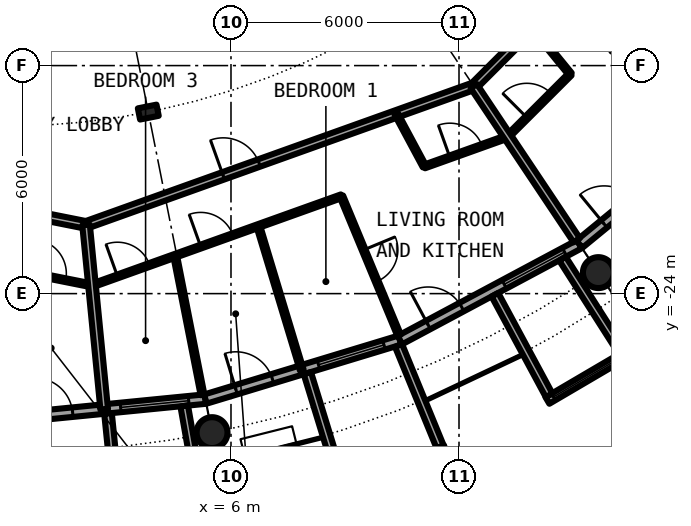
"""IFC4 building model, lengths in metres.
Left out: names, types, materials, properties, quantities, classifications, styles, units other than length and angle.
Written with IfcOpenShell. Run it as: python <this file> out.ifc"""

import sys

from ifc_helpers import new_model, si_unit, direction, frame, frame_2d, origin, origin_2d, place, context, subcontext, project, spatial, rectangle, circle, hollow_circle, i_section, extrude, element, fill, save


model = new_model("IFC4")
c1 = context("Model", 3, precision=1e-05, world=origin(), true_north=direction((0.0, 1.0)))
c2 = subcontext(c1, "Body", "Model", "MODEL_VIEW")
j1 = project(units=[si_unit("LENGTHUNIT", "METRE"), si_unit("PLANEANGLEUNIT", "RADIAN")], contexts=[c1])
p1 = place(None, origin())
s1 = spatial("IfcSite", under=j1, at=p1, CompositionType="ELEMENT")
p2 = place(p1, origin())
s2 = spatial("IfcBuilding", under=s1, at=p2, CompositionType="ELEMENT")
p3 = place(p2, frame((0.0, 0.0, 173.8)))
s3 = spatial("IfcBuildingStorey", under=s2, at=p3, CompositionType="ELEMENT", Elevation=173.8)
for number, where, z_axis, x_axis in (
    (1, (5.501, -27.658, 0.0), (0.0, 0.0, 1.0), (1.0, 0.0, 0.0)),
    (2, (15.667, -23.448, 0.0), (0.0, 0.0, 1.0), (1.0, 0.0, 0.0)),
):
    element("IfcColumn", number, at=place(p3, frame(where, z_axis=z_axis, x_axis=x_axis)), inside=s3, PredefinedType="COLUMN", context=c2, shape_type="SweptSolid", body=[
        extrude(hollow_circle(Radius=0.406, WallThickness=0.04, at=origin_2d()), origin(), (0.0, 0.0, 1.0), 3.05),
    ])
p4 = place(p3, frame((3.824, -19.223, 0.0), z_axis=(0.0, 0.0, 1.0), x_axis=(0.195090322016, -0.980785280403, 0.0)))
e3 = element("IfcColumn", 3, at=p4, inside=s3, PredefinedType="COLUMN", context=c2, shape_type="SweptSolid", body=[
    extrude(i_section(OverallWidth=0.3, OverallDepth=0.5, WebThickness=0.014, FlangeThickness=0.028, FilletRadius=0.027, at=origin_2d()), origin(), (0.0, 0.0, 1.0), 3.05),
])
p5 = place(p3, frame((0.0, -27.3, 0.0), z_axis=(0.0, 0.0, 1.0), x_axis=(0.995173996315, 0.098126026407, 0.0)))
e4 = element("IfcWall", 4, at=p5, inside=s3, PredefinedType="SOLIDWALL", context=c2, shape_type="SweptSolid", body=[
    extrude(rectangle(XDim=5.352, YDim=0.25, at=frame_2d((2.676, 0.0))), origin(), (0.0, 0.0, 1.0), 2.7),
])
p6 = place(p5, frame((0.841, 0.0, 0.0)))
e5 = element("IfcOpeningElement", 5, at=p6, cuts=e4, PredefinedType="OPENING", context=c2, shape_type="SweptSolid", body=[
    extrude(rectangle(XDim=1.0, YDim=2.2, at=frame_2d((0.5, 1.1))), frame((0.0, 0.135, 0.0), z_axis=(0.0, -1.0, 0.0), x_axis=(1.0, 0.0, 0.0)), (0.0, 0.0, 1.0), 0.27),
])
p7 = place(p5, frame((3.111, 0.0, 0.3)))
e6 = element("IfcOpeningElement", 6, at=p7, cuts=e4, PredefinedType="OPENING", context=c2, shape_type="SweptSolid", body=[
    extrude(rectangle(XDim=1.8, YDim=2.1, at=frame_2d((0.9, 1.05))), frame((0.0, 0.135, 0.0), z_axis=(0.0, -1.0, 0.0), x_axis=(1.0, 0.0, 0.0)), (0.0, 0.0, 1.0), 0.27),
])
p8 = place(p3, frame((2.764, -27.153, -0.03), z_axis=(0.0, 0.0, 1.0), x_axis=(0.101505487237, -0.994834979311, 0.0)))
e7 = element("IfcWall", 7, at=p8, inside=s3, PredefinedType="SOLIDWALL", context=c2, shape_type="SweptSolid", body=[
    extrude(rectangle(XDim=3.007, YDim=0.2, at=frame_2d((1.503, 0.0))), origin(), (0.0, 0.0, 1.0), 2.73),
])
p9 = place(p3, frame((4.769, -26.956, -0.03), z_axis=(0.0, 0.0, 1.0), x_axis=(0.174056778901, -0.984735618183, 0.0)))
e8 = element("IfcWall", 8, at=p9, inside=s3, PredefinedType="SOLIDWALL", context=c2, shape_type="SweptSolid", body=[
    extrude(rectangle(XDim=2.925, YDim=0.2, at=frame_2d((1.462, 0.0))), origin(), (0.0, 0.0, 1.0), 2.73),
])
p10 = place(p3, frame((5.326, -26.775, 0.0), z_axis=(0.0, 0.0, 1.0), x_axis=(0.956965678721, 0.290201119486, 0.0)))
e9 = element("IfcWall", 9, at=p10, inside=s3, PredefinedType="SOLIDWALL", context=c2, shape_type="SweptSolid", body=[
    extrude(rectangle(XDim=5.351, YDim=0.25, at=frame_2d((2.676, 0.0))), origin(), (0.0, 0.0, 1.0), 2.7),
])
p11 = place(p10, frame((0.841, 0.0, 0.0)))
e10 = element("IfcOpeningElement", 10, at=p11, cuts=e9, PredefinedType="OPENING", context=c2, shape_type="SweptSolid", body=[
    extrude(rectangle(XDim=1.0, YDim=2.2, at=frame_2d((0.5, 1.1))), frame((0.0, 0.135, 0.0), z_axis=(0.0, -1.0, 0.0), x_axis=(1.0, 0.0, 0.0)), (0.0, 0.0, 1.0), 0.27),
])
p12 = place(p10, frame((3.111, 0.0, 0.3)))
e11 = element("IfcOpeningElement", 11, at=p12, cuts=e9, PredefinedType="OPENING", context=c2, shape_type="SweptSolid", body=[
    extrude(rectangle(XDim=1.8, YDim=2.1, at=frame_2d((0.9, 1.05))), frame((0.0, 0.135, 0.0), z_axis=(0.0, -1.0, 0.0), x_axis=(1.0, 0.0, 0.0)), (0.0, 0.0, 1.0), 0.27),
])
p13 = place(p3, frame((8.82, -29.093, -0.03), z_axis=(0.0, 0.0, 1.0), x_axis=(0.941461077774, 0.337121697664, 0.0)))
e12 = element("IfcWall", 12, at=p13, inside=s3, PredefinedType="SOLIDWALL", context=c2, shape_type="SweptSolid", body=[
    extrude(rectangle(XDim=2.993, YDim=0.2, at=frame_2d((1.497, 0.0))), origin(), (0.0, 0.0, 1.0), 2.73),
])
p14 = place(p13, frame((0.457, 0.0, 0.33)))
e13 = element("IfcOpeningElement", 13, at=p14, cuts=e12, PredefinedType="OPENING", context=c2, shape_type="SweptSolid", body=[
    extrude(circle(Radius=1.04, at=frame_2d((1.04, 1.04))), frame((0.0, 0.11, 0.0), z_axis=(0.0, -1.0, 0.0), x_axis=(1.0, 0.0, 0.0)), (0.0, 0.0, 1.0), 0.22),
])
p15 = place(p3, frame((8.009, -26.092, -0.03), z_axis=(0.0, 0.0, 1.0), x_axis=(0.293406695073, -0.955987715029, 0.0)))
e14 = element("IfcWall", 14, at=p15, inside=s3, PredefinedType="SOLIDWALL", context=c2, shape_type="SweptSolid", body=[
    extrude(rectangle(XDim=3.006, YDim=0.2, at=frame_2d((1.503, 0.0))), origin(), (0.0, 0.0, 1.0), 2.73),
])
p16 = place(p3, frame((10.409, -25.364, -0.03), z_axis=(0.0, 0.0, 1.0), x_axis=(0.379509886562, -0.925187681501, 0.0)))
e15 = element("IfcWall", 15, at=p16, inside=s3, PredefinedType="SOLIDWALL", context=c2, shape_type="SweptSolid", body=[
    extrude(rectangle(XDim=2.883, YDim=0.2, at=frame_2d((1.441, 0.0))), origin(), (0.0, 0.0, 1.0), 2.73),
])
p17 = place(p3, frame((10.447, -25.222, 0.0), z_axis=(0.0, 0.0, 1.0), x_axis=(0.881915646801, 0.471407246368, 0.0)))
e16 = element("IfcWall", 16, at=p17, inside=s3, PredefinedType="SOLIDWALL", context=c2, shape_type="SweptSolid", body=[
    extrude(rectangle(XDim=5.352, YDim=0.25, at=frame_2d((2.676, 0.0))), origin(), (0.0, 0.0, 1.0), 2.7),
])
p18 = place(p17, frame((0.841, 0.0, 0.0)))
e17 = element("IfcOpeningElement", 17, at=p18, cuts=e16, PredefinedType="OPENING", context=c2, shape_type="SweptSolid", body=[
    extrude(rectangle(XDim=1.0, YDim=2.2, at=frame_2d((0.5, 1.1))), frame((0.0, 0.135, 0.0), z_axis=(0.0, -1.0, 0.0), x_axis=(1.0, 0.0, 0.0)), (0.0, 0.0, 1.0), 0.27),
])
p19 = place(p17, frame((3.111, 0.0, 0.3)))
e18 = element("IfcOpeningElement", 18, at=p19, cuts=e16, PredefinedType="OPENING", context=c2, shape_type="SweptSolid", body=[
    extrude(rectangle(XDim=1.8, YDim=2.1, at=frame_2d((0.9, 1.05))), frame((0.0, 0.135, 0.0), z_axis=(0.0, -1.0, 0.0), x_axis=(1.0, 0.0, 0.0)), (0.0, 0.0, 1.0), 0.27),
])
p20 = place(p3, frame((14.327, -26.812, -0.03), z_axis=(0.0, 0.0, 1.0), x_axis=(0.862403467503, 0.506221551535, 0.0)))
e19 = element("IfcWall", 19, at=p20, inside=s3, PredefinedType="SOLIDWALL", context=c2, shape_type="SweptSolid", body=[
    extrude(rectangle(XDim=2.446, YDim=0.2, at=frame_2d((1.223, 0.0))), origin(), (0.0, 0.0, 1.0), 2.73),
])
p21 = place(p20, frame((0.183, 0.0, 0.33)))
e20 = element("IfcOpeningElement", 20, at=p21, cuts=e19, PredefinedType="OPENING", context=c2, shape_type="SweptSolid", body=[
    extrude(circle(Radius=1.04, at=frame_2d((1.04, 1.04))), frame((0.0, 0.11, 0.0), z_axis=(0.0, -1.0, 0.0), x_axis=(1.0, 0.0, 0.0)), (0.0, 0.0, 1.0), 0.22),
])
p22 = place(p3, frame((12.945, -24.029, -0.03), z_axis=(0.0, 0.0, 1.0), x_axis=(0.474424310775, -0.88029629861, 0.0)))
e21 = element("IfcWall", 21, at=p22, inside=s3, PredefinedType="SOLIDWALL", context=c2, shape_type="SweptSolid", body=[
    extrude(rectangle(XDim=3.006, YDim=0.2, at=frame_2d((1.503, 0.0))), origin(), (0.0, 0.0, 1.0), 2.73),
])
p23 = place(p3, frame((14.722, -23.079, -0.03), z_axis=(0.0, 0.0, 1.0), x_axis=(0.537572179146, -0.843217737129, 0.0)))
e22 = element("IfcWall", 22, at=p23, inside=s3, PredefinedType="SOLIDWALL", context=c2, shape_type="SweptSolid", body=[
    extrude(rectangle(XDim=2.924, YDim=0.2, at=frame_2d((1.462, 0.0))), origin(), (0.0, 0.0, 1.0), 2.73),
])
p24 = place(p3, frame((15.167, -22.699, 0.0), z_axis=(0.0, 0.0, 1.0), x_axis=(0.773019449054, 0.634382322723, 0.0)))
e23 = element("IfcWall", 23, at=p24, inside=s3, PredefinedType="SOLIDWALL", context=c2, shape_type="SweptSolid", body=[
    extrude(rectangle(XDim=5.352, YDim=0.25, at=frame_2d((2.676, 0.0))), origin(), (0.0, 0.0, 1.0), 2.7),
])
p25 = place(p24, frame((0.841, 0.0, 0.0)))
e24 = element("IfcOpeningElement", 24, at=p25, cuts=e23, PredefinedType="OPENING", context=c2, shape_type="SweptSolid", body=[
    extrude(rectangle(XDim=1.0, YDim=2.2, at=frame_2d((0.5, 1.1))), frame((0.0, 0.135, 0.0), z_axis=(0.0, -1.0, 0.0), x_axis=(1.0, 0.0, 0.0)), (0.0, 0.0, 1.0), 0.27),
])
p26 = place(p24, frame((3.111, 0.0, 0.3)))
e25 = element("IfcOpeningElement", 25, at=p26, cuts=e23, PredefinedType="OPENING", context=c2, shape_type="SweptSolid", body=[
    extrude(rectangle(XDim=1.8, YDim=2.1, at=frame_2d((0.9, 1.05))), frame((0.0, 0.135, 0.0), z_axis=(0.0, -1.0, 0.0), x_axis=(1.0, 0.0, 0.0)), (0.0, 0.0, 1.0), 0.27),
])
p27 = place(p3, frame((13.278, -19.872, 0.0), z_axis=(0.0, 0.0, 1.0), x_axis=(0.707316201218, 0.706897299114, 0.0)))
e26 = element("IfcWall", 26, at=p27, inside=s3, PredefinedType="PARTITIONING", context=c2, shape_type="SweptSolid", body=[
    extrude(rectangle(XDim=2.331, YDim=0.1, at=frame_2d((1.166, 0.0))), origin(), (0.0, 0.0, 1.0), 2.7),
])
p28 = place(p27, frame((0.716, 0.0, 0.0)))
e27 = element("IfcOpeningElement", 27, at=p28, cuts=e26, PredefinedType="OPENING", context=c2, shape_type="SweptSolid", body=[
    extrude(rectangle(XDim=0.9, YDim=2.3, at=frame_2d((0.45, 1.15))), frame((0.0, 0.06, 0.0), z_axis=(0.0, -1.0, 0.0), x_axis=(1.0, 0.0, 0.0)), (0.0, 0.0, 1.0), 0.12),
])
p29 = place(p3, frame((2.347, -23.786, 0.0), z_axis=(0.0, 0.0, 1.0), x_axis=(0.941468908751, 0.33709982773, 0.0)))
e28 = element("IfcWall", 28, at=p29, inside=s3, PredefinedType="PARTITIONING", context=c2, shape_type="SweptSolid", body=[
    extrude(rectangle(XDim=6.968, YDim=0.1, at=frame_2d((3.484, 0.0))), origin(), (0.0, 0.0, 1.0), 2.7),
])
p30 = place(p29, frame((3.034, 0.0, 0.0)))
e29 = element("IfcOpeningElement", 29, at=p30, cuts=e28, PredefinedType="OPENING", context=c2, shape_type="SweptSolid", body=[
    extrude(rectangle(XDim=0.9, YDim=2.3, at=frame_2d((0.45, 1.15))), frame((0.0, 0.06, 0.0), z_axis=(0.0, -1.0, 0.0), x_axis=(1.0, 0.0, 0.0)), (0.0, 0.0, 1.0), 0.12),
])
p31 = place(p29, frame((0.708, 0.0, 0.0)))
e30 = element("IfcOpeningElement", 30, at=p31, cuts=e28, PredefinedType="OPENING", context=c2, shape_type="SweptSolid", body=[
    extrude(rectangle(XDim=0.9, YDim=2.3, at=frame_2d((0.45, 1.15))), frame((0.0, 0.06, 0.0), z_axis=(0.0, -1.0, 0.0), x_axis=(1.0, 0.0, 0.0)), (0.0, 0.0, 1.0), 0.12),
])
p32 = place(p3, frame((11.091, -20.655, 0.0), z_axis=(0.0, 0.0, 1.0), x_axis=(0.941484831917, 0.337055353422, 0.0)))
e31 = element("IfcWall", 31, at=p32, inside=s3, PredefinedType="PARTITIONING", context=c2, shape_type="SweptSolid", body=[
    extrude(rectangle(XDim=2.323, YDim=0.1, at=frame_2d((1.162, 0.0))), origin(), (0.0, 0.0, 1.0), 2.7),
])
p33 = place(p32, frame((0.711, 0.0, 0.0)))
e32 = element("IfcOpeningElement", 32, at=p33, cuts=e31, PredefinedType="OPENING", context=c2, shape_type="SweptSolid", body=[
    extrude(rectangle(XDim=0.9, YDim=2.3, at=frame_2d((0.45, 1.15))), frame((0.0, 0.06, 0.0), z_axis=(0.0, -1.0, 0.0), x_axis=(1.0, 0.0, 0.0)), (0.0, 0.0, 1.0), 0.12),
])
p34 = place(p3, frame((-4.462, -22.431, 0.0), z_axis=(0.0, 0.0, 1.0), x_axis=(0.980773728025, -0.195148390759, 0.0)))
e33 = element("IfcWall", 33, at=p34, inside=s3, PredefinedType="PARTITIONING", context=c2, shape_type="SweptSolid", body=[
    extrude(rectangle(XDim=6.938, YDim=0.1, at=frame_2d((3.469, 0.0))), origin(), (0.0, 0.0, 1.0), 2.7),
])
p35 = place(p34, frame((3.018, 0.0, 0.0)))
e34 = element("IfcOpeningElement", 34, at=p35, cuts=e33, PredefinedType="OPENING", context=c2, shape_type="SweptSolid", body=[
    extrude(rectangle(XDim=0.9, YDim=2.3, at=frame_2d((0.45, 1.15))), frame((0.0, 0.06, 0.0), z_axis=(0.0, -1.0, 0.0), x_axis=(1.0, 0.0, 0.0)), (0.0, 0.0, 1.0), 0.12),
])
p36 = place(p34, frame((5.332, 0.0, 0.0)))
e35 = element("IfcOpeningElement", 35, at=p36, cuts=e33, PredefinedType="OPENING", context=c2, shape_type="SweptSolid", body=[
    extrude(rectangle(XDim=0.9, YDim=2.3, at=frame_2d((0.45, 1.15))), frame((0.0, 0.06, 0.0), z_axis=(0.0, -1.0, 0.0), x_axis=(1.0, 0.0, 0.0)), (0.0, 0.0, 1.0), 0.12),
])
p37 = place(p3, frame((12.389, -18.542, 0.0), z_axis=(0.0, 0.0, 1.0), x_axis=(0.707106781187, 0.707106781187, 0.0)))
e36 = element("IfcWall", 36, at=p37, inside=s3, PredefinedType="PARTITIONING", context=c2, shape_type="SweptSolid", body=[
    extrude(rectangle(XDim=8.702, YDim=0.2, at=frame_2d((4.351, 0.0))), origin(), (0.0, 0.0, 1.0), 2.7),
])
p38 = place(p37, frame((4.938, 0.0, 0.0)))
e37 = element("IfcOpeningElement", 37, at=p38, cuts=e36, PredefinedType="OPENING", context=c2, shape_type="SweptSolid", body=[
    extrude(rectangle(XDim=1.0, YDim=2.3, at=frame_2d((0.5, 1.15))), frame((0.0, 0.11, 0.0), z_axis=(0.0, -1.0, 0.0), x_axis=(1.0, 0.0, 0.0)), (0.0, 0.0, 1.0), 0.22),
])
p39 = place(p3, frame((2.186, -22.193, 0.0), z_axis=(0.0, 0.0, 1.0), x_axis=(0.941530192736, 0.336928621769, 0.0)))
e38 = element("IfcWall", 38, at=p39, inside=s3, PredefinedType="PARTITIONING", context=c2, shape_type="SweptSolid", body=[
    extrude(rectangle(XDim=10.836, YDim=0.2, at=frame_2d((5.418, 0.0))), origin(), (0.0, 0.0, 1.0), 2.7),
])
p40 = place(p39, frame((3.835, 0.0, 0.0)))
e39 = element("IfcOpeningElement", 39, at=p40, cuts=e38, PredefinedType="OPENING", context=c2, shape_type="SweptSolid", body=[
    extrude(rectangle(XDim=1.0, YDim=2.3, at=frame_2d((0.5, 1.15))), frame((0.0, 0.11, 0.0), z_axis=(0.0, -1.0, 0.0), x_axis=(1.0, 0.0, 0.0)), (0.0, 0.0, 1.0), 0.22),
])
p41 = place(p3, frame((-10.512, -19.667, 0.0), z_axis=(0.0, 0.0, 1.0), x_axis=(0.980780341017, -0.195115152343, 0.0)))
e40 = element("IfcWall", 40, at=p41, inside=s3, PredefinedType="PARTITIONING", context=c2, shape_type="SweptSolid", body=[
    extrude(rectangle(XDim=12.947, YDim=0.2, at=frame_2d((6.473, 0.0))), origin(), (0.0, 0.0, 1.0), 2.7),
])
p42 = place(p41, frame((7.052, 0.0, 0.0)))
e41 = element("IfcOpeningElement", 41, at=p42, cuts=e40, PredefinedType="OPENING", context=c2, shape_type="SweptSolid", body=[
    extrude(rectangle(XDim=1.0, YDim=2.3, at=frame_2d((0.5, 1.15))), frame((0.0, 0.11, 0.0), z_axis=(0.0, -1.0, 0.0), x_axis=(1.0, 0.0, 0.0)), (0.0, 0.0, 1.0), 0.22),
])
p43 = place(p3, frame((13.927, -17.004, 0.0), z_axis=(0.0, 0.0, 1.0), x_axis=(0.633861186344, -0.773446828454, 0.0)))
e42 = element("IfcWall", 42, at=p43, inside=s3, PredefinedType="PARTITIONING", context=c2, shape_type="SweptSolid", body=[
    extrude(rectangle(XDim=1.578, YDim=0.1, at=frame_2d((0.789, 0.0))), origin(), (0.0, 0.0, 1.0), 2.7),
])
p44 = place(p3, frame((2.186, -22.193, 0.0), z_axis=(0.0, 0.0, 1.0), x_axis=(0.098070432075, -0.995179476453, 0.0)))
e43 = element("IfcWall", 43, at=p44, inside=s3, PredefinedType="PARTITIONING", context=c2, shape_type="SweptSolid", body=[
    extrude(rectangle(XDim=4.874, YDim=0.2, at=frame_2d((2.437, 0.0))), origin(), (0.0, 0.0, 1.0), 2.7),
])
p45 = place(p3, frame((4.53, -23.002, 0.0), z_axis=(0.0, 0.0, 1.0), x_axis=(0.193208762378, -0.981157670377, 0.0)))
e44 = element("IfcWall", 44, at=p45, inside=s3, PredefinedType="PARTITIONING", context=c2, shape_type="SweptSolid", body=[
    extrude(rectangle(XDim=3.731, YDim=0.1, at=frame_2d((1.866, 0.0))), origin(), (0.0, 0.0, 1.0), 2.7),
])
p46 = place(p3, frame((6.717, -22.22, 0.0), z_axis=(0.0, 0.0, 1.0), x_axis=(0.289292320694, -0.957240802091, 0.0)))
e45 = element("IfcWall", 45, at=p46, inside=s3, PredefinedType="PARTITIONING", context=c2, shape_type="SweptSolid", body=[
    extrude(rectangle(XDim=3.961, YDim=0.1, at=frame_2d((1.981, 0.0))), origin(), (0.0, 0.0, 1.0), 2.7),
])
p47 = place(p3, frame((8.904, -21.437, 0.0), z_axis=(0.0, 0.0, 1.0), x_axis=(0.383639475888, -0.923482946535, 0.0)))
e46 = element("IfcWall", 46, at=p47, inside=s3, PredefinedType="PARTITIONING", context=c2, shape_type="SweptSolid", body=[
    extrude(rectangle(XDim=3.962, YDim=0.1, at=frame_2d((1.981, 0.0))), origin(), (0.0, 0.0, 1.0), 2.7),
])
p48 = place(p47, frame((1.531, 0.0, 0.0)))
e47 = element("IfcOpeningElement", 47, at=p48, cuts=e46, PredefinedType="OPENING", context=c2, shape_type="SweptSolid", body=[
    extrude(rectangle(XDim=0.9, YDim=2.3, at=frame_2d((0.45, 1.15))), frame((0.0, 0.06, 0.0), z_axis=(0.0, -1.0, 0.0), x_axis=(1.0, 0.0, 0.0)), (0.0, 0.0, 1.0), 0.12),
])
p49 = place(p3, frame((12.389, -18.542, 0.0), z_axis=(0.0, 0.0, 1.0), x_axis=(0.55569370664, -0.831387096605, 0.0)))
e48 = element("IfcWall", 48, at=p49, inside=s3, PredefinedType="PARTITIONING", context=c2, shape_type="SweptSolid", body=[
    extrude(rectangle(XDim=4.875, YDim=0.2, at=frame_2d((2.438, 0.0))), origin(), (0.0, 0.0, 1.0), 2.7),
])
p50 = place(p3, frame((10.349, -19.272, 0.0), z_axis=(0.0, 0.0, 1.0), x_axis=(0.472726382089, -0.881209264407, 0.0)))
e49 = element("IfcWall", 49, at=p50, inside=s3, PredefinedType="PARTITIONING", context=c2, shape_type="SweptSolid", body=[
    extrude(rectangle(XDim=1.57, YDim=0.1, at=frame_2d((0.785, 0.0))), origin(), (0.0, 0.0, 1.0), 2.7),
])
p51 = place(p6, origin())
e50 = element("IfcDoor", 50, at=p51, inside=s3, OperationType="SINGLE_SWING_LEFT", PredefinedType="DOOR", context=c2, shape_type="SweptSolid", body=[
    extrude(rectangle(XDim=1.0, YDim=2.2, at=frame_2d((0.5, 1.1))), frame((0.0, 0.025, 0.0), z_axis=(0.0, -1.0, 0.0), x_axis=(1.0, 0.0, 0.0)), (0.0, 0.0, 1.0), 0.05),
])
fill(e5, e50)
p52 = place(p7, origin())
e51 = element("IfcWindow", 51, at=p52, inside=s3, PartitioningType="SINGLE_PANEL", PredefinedType="WINDOW", context=c2, shape_type="SweptSolid", body=[
    extrude(rectangle(XDim=1.8, YDim=2.1, at=frame_2d((0.9, 1.05))), frame((0.0, 0.03, 0.0), z_axis=(0.0, -1.0, 0.0), x_axis=(1.0, 0.0, 0.0)), (0.0, 0.0, 1.0), 0.06),
])
fill(e6, e51)
p53 = place(p11, origin())
e52 = element("IfcDoor", 52, at=p53, inside=s3, OperationType="SINGLE_SWING_LEFT", PredefinedType="DOOR", context=c2, shape_type="SweptSolid", body=[
    extrude(rectangle(XDim=1.0, YDim=2.2, at=frame_2d((0.5, 1.1))), frame((0.0, 0.025, 0.0), z_axis=(0.0, -1.0, 0.0), x_axis=(1.0, 0.0, 0.0)), (0.0, 0.0, 1.0), 0.05),
])
fill(e10, e52)
p54 = place(p12, origin())
e53 = element("IfcWindow", 53, at=p54, inside=s3, PartitioningType="SINGLE_PANEL", PredefinedType="WINDOW", context=c2, shape_type="SweptSolid", body=[
    extrude(rectangle(XDim=1.8, YDim=2.1, at=frame_2d((0.9, 1.05))), frame((0.0, 0.03, 0.0), z_axis=(0.0, -1.0, 0.0), x_axis=(1.0, 0.0, 0.0)), (0.0, 0.0, 1.0), 0.06),
])
fill(e11, e53)
p55 = place(p18, origin())
e54 = element("IfcDoor", 54, at=p55, inside=s3, OperationType="SINGLE_SWING_LEFT", PredefinedType="DOOR", context=c2, shape_type="SweptSolid", body=[
    extrude(rectangle(XDim=1.0, YDim=2.2, at=frame_2d((0.5, 1.1))), frame((0.0, 0.025, 0.0), z_axis=(0.0, -1.0, 0.0), x_axis=(1.0, 0.0, 0.0)), (0.0, 0.0, 1.0), 0.05),
])
fill(e17, e54)
p56 = place(p19, origin())
e55 = element("IfcWindow", 55, at=p56, inside=s3, PartitioningType="SINGLE_PANEL", PredefinedType="WINDOW", context=c2, shape_type="SweptSolid", body=[
    extrude(rectangle(XDim=1.8, YDim=2.1, at=frame_2d((0.9, 1.05))), frame((0.0, 0.03, 0.0), z_axis=(0.0, -1.0, 0.0), x_axis=(1.0, 0.0, 0.0)), (0.0, 0.0, 1.0), 0.06),
])
fill(e18, e55)
p57 = place(p21, origin())
e56 = element("IfcWindow", 56, at=p57, inside=s3, PartitioningType="SINGLE_PANEL", PredefinedType="WINDOW", context=c2, shape_type="SweptSolid", body=[
    extrude(circle(Radius=1.04, at=frame_2d((1.04, 1.04))), frame((0.0, 0.03, 0.0), z_axis=(0.0, -1.0, 0.0), x_axis=(1.0, 0.0, 0.0)), (0.0, 0.0, 1.0), 0.06),
])
fill(e20, e56)
p58 = place(p25, origin())
e57 = element("IfcDoor", 57, at=p58, inside=s3, OperationType="SINGLE_SWING_LEFT", PredefinedType="DOOR", context=c2, shape_type="SweptSolid", body=[
    extrude(rectangle(XDim=1.0, YDim=2.2, at=frame_2d((0.5, 1.1))), frame((0.0, 0.025, 0.0), z_axis=(0.0, -1.0, 0.0), x_axis=(1.0, 0.0, 0.0)), (0.0, 0.0, 1.0), 0.05),
])
fill(e24, e57)
p59 = place(p36, origin())
e58 = element("IfcDoor", 58, at=p59, inside=s3, OperationType="SINGLE_SWING_RIGHT", PredefinedType="DOOR", context=c2, shape_type="SweptSolid", body=[
    extrude(rectangle(XDim=0.9, YDim=2.3, at=frame_2d((0.45, 1.15))), frame((0.0, 0.025, 0.0), z_axis=(0.0, -1.0, 0.0), x_axis=(1.0, 0.0, 0.0)), (0.0, 0.0, 1.0), 0.05),
])
fill(e35, e58)
p60 = place(p40, origin())
e59 = element("IfcDoor", 59, at=p60, inside=s3, OperationType="SINGLE_SWING_LEFT", PredefinedType="DOOR", context=c2, shape_type="SweptSolid", body=[
    extrude(rectangle(XDim=1.0, YDim=2.3, at=frame_2d((0.5, 1.15))), frame((0.0, 0.025, 0.0), z_axis=(0.0, -1.0, 0.0), x_axis=(1.0, 0.0, 0.0)), (0.0, 0.0, 1.0), 0.05),
])
fill(e39, e59)
p61 = place(p33, origin())
e60 = element("IfcDoor", 60, at=p61, inside=s3, OperationType="SINGLE_SWING_RIGHT", PredefinedType="DOOR", context=c2, shape_type="SweptSolid", body=[
    extrude(rectangle(XDim=0.9, YDim=2.3, at=frame_2d((0.45, 1.15))), frame((0.0, 0.025, 0.0), z_axis=(0.0, -1.0, 0.0), x_axis=(1.0, 0.0, 0.0)), (0.0, 0.0, 1.0), 0.05),
])
fill(e32, e60)
p62 = place(p48, origin())
e61 = element("IfcDoor", 61, at=p62, inside=s3, OperationType="SINGLE_SWING_LEFT", PredefinedType="DOOR", context=c2, shape_type="SweptSolid", body=[
    extrude(rectangle(XDim=0.9, YDim=2.3, at=frame_2d((0.45, 1.15))), frame((0.0, 0.025, 0.0), z_axis=(0.0, -1.0, 0.0), x_axis=(1.0, 0.0, 0.0)), (0.0, 0.0, 1.0), 0.05),
])
fill(e47, e61)
p63 = place(p30, origin())
e62 = element("IfcDoor", 62, at=p63, inside=s3, OperationType="SINGLE_SWING_RIGHT", PredefinedType="DOOR", context=c2, shape_type="SweptSolid", body=[
    extrude(rectangle(XDim=0.9, YDim=2.3, at=frame_2d((0.45, 1.15))), frame((0.0, 0.025, 0.0), z_axis=(0.0, -1.0, 0.0), x_axis=(1.0, 0.0, 0.0)), (0.0, 0.0, 1.0), 0.05),
])
fill(e29, e62)
p64 = place(p31, origin())
e63 = element("IfcDoor", 63, at=p64, inside=s3, OperationType="SINGLE_SWING_LEFT", PredefinedType="DOOR", context=c2, shape_type="SweptSolid", body=[
    extrude(rectangle(XDim=0.9, YDim=2.3, at=frame_2d((0.45, 1.15))), frame((0.0, 0.025, 0.0), z_axis=(0.0, -1.0, 0.0), x_axis=(1.0, 0.0, 0.0)), (0.0, 0.0, 1.0), 0.05),
])
fill(e30, e63)
p65 = place(p28, origin())
e64 = element("IfcDoor", 64, at=p65, inside=s3, OperationType="SINGLE_SWING_RIGHT", PredefinedType="DOOR", context=c2, shape_type="SweptSolid", body=[
    extrude(rectangle(XDim=0.9, YDim=2.3, at=frame_2d((0.45, 1.15))), frame((0.0, 0.025, 0.0), z_axis=(0.0, -1.0, 0.0), x_axis=(1.0, 0.0, 0.0)), (0.0, 0.0, 1.0), 0.05),
])
fill(e27, e64)
save(model, sys.argv[1])
